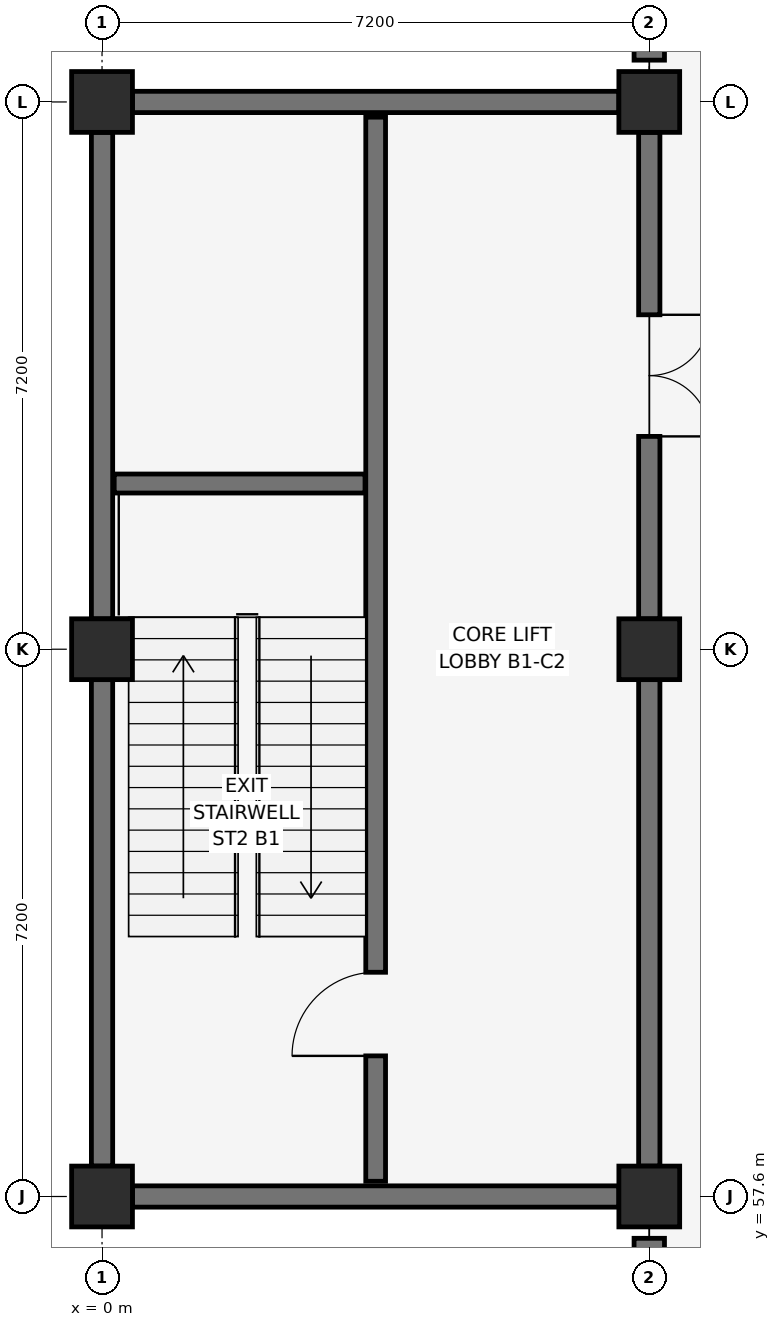
"""IFC4 building model, lengths in metres.
Left out: names, types, materials, properties, quantities, classifications, styles, units other than length and angle.
Written with IfcOpenShell. Run it as: python <this file> out.ifc"""

import sys

from ifc_helpers import new_model, si_unit, direction, frame, frame_2d, origin, origin_2d, place, context, subcontext, project, spatial, rectangle, extrude, element, fill, save


model = new_model("IFC4")
c1 = context("Model", 3, precision=1e-05, world=origin(), true_north=direction((0.0, 1.0)))
c2 = subcontext(c1, "Body", "Model", "MODEL_VIEW")
j1 = project(units=[si_unit("LENGTHUNIT", "METRE"), si_unit("PLANEANGLEUNIT", "RADIAN")], contexts=[c1])
p1 = place(None, origin())
s1 = spatial("IfcSite", under=j1, at=p1, CompositionType="ELEMENT")
p2 = place(p1, origin())
s2 = spatial("IfcBuilding", under=s1, at=p2, CompositionType="ELEMENT")
p3 = place(p2, frame((0.0, 0.0, -5.4)))
s3 = spatial("IfcBuildingStorey", under=s2, at=p3, CompositionType="ELEMENT", Elevation=-5.4)
for number, where, z_axis, x_axis in (
    (1, (0.0, 57.6, -0.45), (0.0, 0.0, 1.0), (1.0, 0.0, 0.0)),
    (2, (0.0, 64.8, -0.45), (0.0, 0.0, 1.0), (1.0, 0.0, 0.0)),
    (3, (0.0, 72.0, -0.45), (0.0, 0.0, 1.0), (1.0, 0.0, 0.0)),
    (4, (7.2, 57.6, -0.45), (0.0, 0.0, 1.0), (1.0, 0.0, 0.0)),
    (5, (7.2, 64.8, -0.45), (0.0, 0.0, 1.0), (1.0, 0.0, 0.0)),
    (6, (7.2, 72.0, -0.45), (0.0, 0.0, 1.0), (1.0, 0.0, 0.0)),
):
    element("IfcColumn", number, at=place(p3, frame(where, z_axis=z_axis, x_axis=x_axis)), inside=s3, PredefinedType="COLUMN", context=c2, shape_type="SweptSolid", body=[
        extrude(rectangle(XDim=0.8, YDim=0.8, at=origin_2d()), origin(), (0.0, 0.0, 1.0), 5.85),
    ])
p4 = place(p3, frame((7.2, 50.95, 0.0), z_axis=(0.0, 0.0, 1.0), x_axis=(0.0, 1.0, 0.0)))
e7 = element("IfcWall", 7, at=p4, inside=s3, PredefinedType="USERDEFINED", context=c2, shape_type="SweptSolid", body=[
    extrude(rectangle(XDim=6.1, YDim=0.4, at=frame_2d((3.05, 0.0))), origin(), (0.0, 0.0, 1.0), 5.12),
])
p5 = place(p3, frame((7.2, 72.55, 0.0), z_axis=(0.0, 0.0, 1.0), x_axis=(0.0, 1.0, 0.0)))
e8 = element("IfcWall", 8, at=p5, inside=s3, PredefinedType="USERDEFINED", context=c2, shape_type="SweptSolid", body=[
    extrude(rectangle(XDim=6.1, YDim=0.4, at=frame_2d((3.05, 0.0))), origin(), (0.0, 0.0, 1.0), 5.12),
])
for number, where, z_axis, x_axis in (
    (9, (0.4, 57.6, 0.0), (0.0, 0.0, 1.0), (1.0, 0.0, 0.0)),
    (10, (0.4, 72.0, 0.0), (0.0, 0.0, 1.0), (1.0, 0.0, 0.0)),
):
    element("IfcWall", number, at=place(p3, frame(where, z_axis=z_axis, x_axis=x_axis)), inside=s3, PredefinedType="SHEAR", context=c2, shape_type="SweptSolid", body=[
        extrude(rectangle(XDim=6.4, YDim=0.28, at=frame_2d((3.2, 0.0))), origin(), (0.0, 0.0, 1.0), 5.12),
    ])
p6 = place(p3, frame((0.0, 58.0, 0.0), z_axis=(0.0, 0.0, 1.0), x_axis=(0.0, 1.0, 0.0)))
e11 = element("IfcWall", 11, at=p6, inside=s3, PredefinedType="SHEAR", context=c2, shape_type="SweptSolid", body=[
    extrude(rectangle(XDim=6.4, YDim=0.28, at=frame_2d((3.2, 0.0))), origin(), (0.0, 0.0, 1.0), 5.12),
])
p7 = place(p3, frame((0.0, 65.2, 0.0), z_axis=(0.0, 0.0, 1.0), x_axis=(0.0, 1.0, 0.0)))
e12 = element("IfcWall", 12, at=p7, inside=s3, PredefinedType="SHEAR", context=c2, shape_type="SweptSolid", body=[
    extrude(rectangle(XDim=6.4, YDim=0.28, at=frame_2d((3.2, 0.0))), origin(), (0.0, 0.0, 1.0), 5.12),
])
p8 = place(p3, frame((7.2, 58.0, 0.0), z_axis=(0.0, 0.0, 1.0), x_axis=(0.0, 1.0, 0.0)))
e13 = element("IfcWall", 13, at=p8, inside=s3, PredefinedType="SHEAR", context=c2, shape_type="SweptSolid", body=[
    extrude(rectangle(XDim=6.4, YDim=0.28, at=frame_2d((3.2, 0.0))), origin(), (0.0, 0.0, 1.0), 5.12),
])
p9 = place(p3, frame((7.2, 65.2, 0.0), z_axis=(0.0, 0.0, 1.0), x_axis=(0.0, 1.0, 0.0)))
e14 = element("IfcWall", 14, at=p9, inside=s3, PredefinedType="SHEAR", context=c2, shape_type="SweptSolid", body=[
    extrude(rectangle(XDim=6.4, YDim=0.28, at=frame_2d((3.2, 0.0))), origin(), (0.0, 0.0, 1.0), 5.12),
])
p10 = place(p9, frame((2.4, 0.0, 0.0)))
e15 = element("IfcOpeningElement", 15, at=p10, cuts=e14, PredefinedType="OPENING", context=c2, shape_type="SweptSolid", body=[
    extrude(rectangle(XDim=1.6, YDim=2.2, at=frame_2d((0.8, 1.1))), frame((0.0, 0.155, 0.0), z_axis=(0.0, -1.0, 0.0), x_axis=(1.0, 0.0, 0.0)), (0.0, 0.0, 1.0), 0.31),
])
p11 = place(p3, frame((3.6, 57.8, 0.0), z_axis=(0.0, 0.0, 1.0), x_axis=(0.0, 1.0, 0.0)))
e16 = element("IfcWall", 16, at=p11, inside=s3, PredefinedType="SHEAR", context=c2, shape_type="SweptSolid", body=[
    extrude(rectangle(XDim=14.0, YDim=0.26, at=frame_2d((7.0, 0.0))), origin(), (0.0, 0.0, 1.0), 5.12),
])
p12 = place(p11, frame((1.65, 0.0, 0.0)))
e17 = element("IfcOpeningElement", 17, at=p12, cuts=e16, PredefinedType="OPENING", context=c2, shape_type="SweptSolid", body=[
    extrude(rectangle(XDim=1.1, YDim=2.15, at=frame_2d((0.55, 1.075))), frame((0.0, 0.145, 0.0), z_axis=(0.0, -1.0, 0.0), x_axis=(1.0, 0.0, 0.0)), (0.0, 0.0, 1.0), 0.29),
])
p13 = place(p3, frame((0.16, 66.98, 0.0), z_axis=(0.0, 0.0, 1.0), x_axis=(1.0, 0.0, 0.0)))
e18 = element("IfcWall", 18, at=p13, inside=s3, PredefinedType="SHEAR", context=c2, shape_type="SweptSolid", body=[
    extrude(rectangle(XDim=3.3, YDim=0.25, at=frame_2d((1.65, 0.0))), origin(), (0.0, 0.0, 1.0), 5.12),
])
p14 = place(p12, origin())
e19 = element("IfcDoor", 19, at=p14, inside=s3, OperationType="SINGLE_SWING_LEFT", PredefinedType="DOOR", context=c2, shape_type="SweptSolid", body=[
    extrude(rectangle(XDim=1.1, YDim=2.15, at=frame_2d((0.55, 1.075))), frame((0.0, 0.025, 0.0), z_axis=(0.0, -1.0, 0.0), x_axis=(1.0, 0.0, 0.0)), (0.0, 0.0, 1.0), 0.05),
])
fill(e17, e19)
p15 = place(p10, frame((1.6, 0.0, 0.0), z_axis=(0.0, 0.0, 1.0), x_axis=(-1.0, 0.0, 0.0)))
e20 = element("IfcDoor", 20, at=p15, inside=s3, OperationType="DOUBLE_SWING_LEFT", PredefinedType="DOOR", context=c2, shape_type="SweptSolid", body=[
    extrude(rectangle(XDim=1.6, YDim=2.2, at=frame_2d((0.8, 1.1))), frame((0.0, 0.025, 0.0), z_axis=(0.0, -1.0, 0.0), x_axis=(1.0, 0.0, 0.0)), (0.0, 0.0, 1.0), 0.05),
])
fill(e15, e20)
save(model, sys.argv[1])
